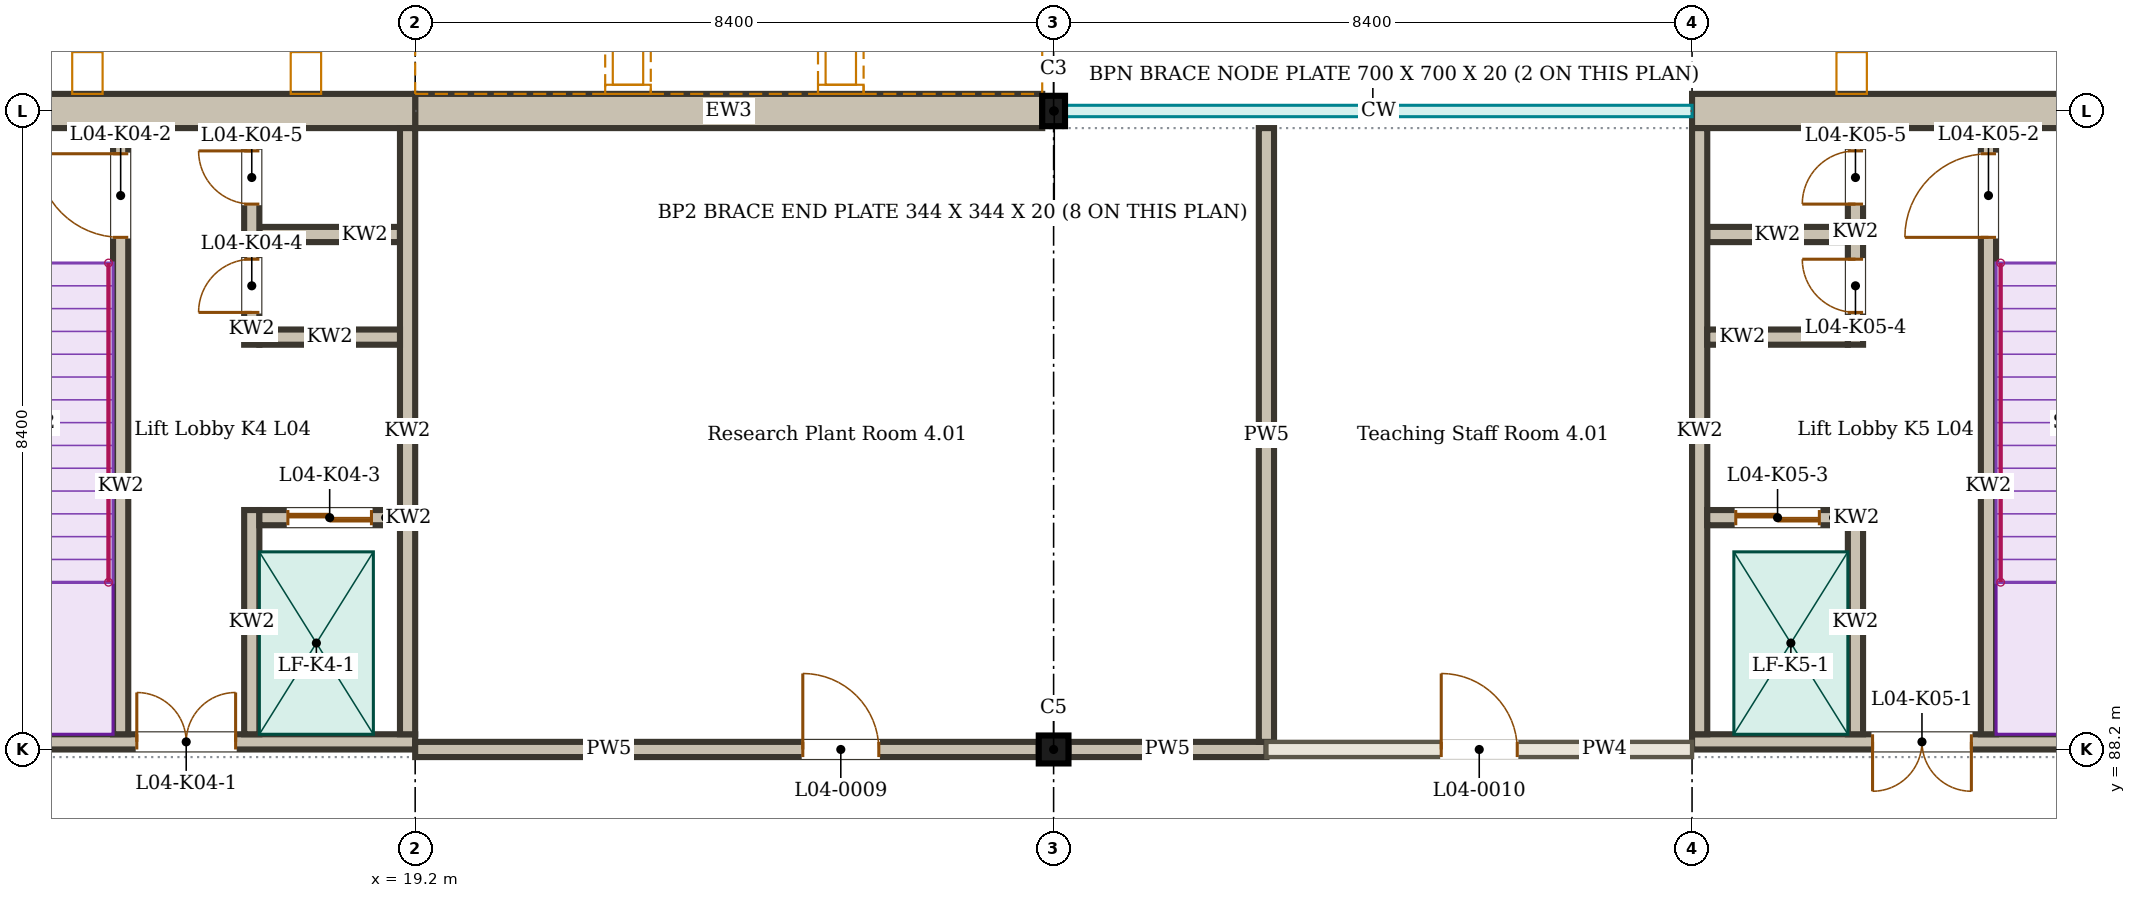
"""IFC4 building model, lengths in metres.
Left out: names, types, materials, properties, quantities, classifications, styles, units other than length and angle.
Written with IfcOpenShell. Run it as: python <this file> out.ifc"""

import sys

from ifc_helpers import new_model, si_unit, direction, frame, frame_2d, origin, origin_2d, place, context, subcontext, project, spatial, rectangle, i_section, extrude, element, fill, save


model = new_model("IFC4")
c1 = context("Model", 3, precision=1e-05, world=origin(), true_north=direction((0.0, 1.0)))
c2 = subcontext(c1, "Body", "Model", "MODEL_VIEW")
j1 = project(units=[si_unit("LENGTHUNIT", "METRE"), si_unit("PLANEANGLEUNIT", "RADIAN")], contexts=[c1])
p1 = place(None, origin())
s1 = spatial("IfcSite", under=j1, at=p1, CompositionType="ELEMENT")
p2 = place(p1, origin())
s2 = spatial("IfcBuilding", under=s1, at=p2, CompositionType="ELEMENT")
p3 = place(p2, frame((0.0, 0.0, 18.0)))
s3 = spatial("IfcBuildingStorey", under=s2, at=p3, CompositionType="ELEMENT", Elevation=18.0)
p4 = place(p3, frame((27.6, 88.2, 0.0), z_axis=(0.0, 0.0, 1.0), x_axis=(1.0, 0.0, 0.0)))
e1 = element("IfcColumn", 1, at=p4, inside=s3, PredefinedType="COLUMN", context=c2, shape_type="SweptSolid", body=[
    extrude(i_section(OverallWidth=0.391, OverallDepth=0.368, WebThickness=0.015, FlangeThickness=0.024, FilletRadius=0.027, at=origin_2d()), origin(), (0.0, 0.0, 1.0), 4.5),
])
p5 = place(p3, frame((27.6, 96.6, 0.0), z_axis=(0.0, 0.0, 1.0), x_axis=(1.0, 0.0, 0.0)))
e2 = element("IfcColumn", 2, at=p5, inside=s3, PredefinedType="COLUMN", context=c2, shape_type="SweptSolid", body=[
    extrude(i_section(OverallWidth=0.3, OverallDepth=0.4, WebThickness=0.013, FlangeThickness=0.024, FilletRadius=0.027, at=origin_2d()), origin(), (0.0, 0.0, 1.0), 4.5),
])
p6 = place(p3, frame((19.2, 96.6, 0.0), z_axis=(0.0, 0.0, 1.0), x_axis=(1.0, 0.0, 0.0)))
e3 = element("IfcWall", 3, at=p6, inside=s3, PredefinedType="SOLIDWALL", context=c2, shape_type="SweptSolid", body=[
    extrude(rectangle(XDim=8.25, YDim=0.45, at=frame_2d((4.125, 0.0))), origin(), (0.0, 0.0, 1.0), 3.886),
])
p7 = place(p3, frame((19.2, 88.2, 0.0), z_axis=(0.0, 0.0, 1.0), x_axis=(1.0, 0.0, 0.0)))
e4 = element("IfcWall", 4, at=p7, inside=s3, PredefinedType="SOLIDWALL", context=c2, shape_type="SweptSolid", body=[
    extrude(rectangle(XDim=8.205, YDim=0.2, at=frame_2d((4.102, 0.0))), origin(), (0.0, 0.0, 1.0), 3.9),
])
p8 = place(p7, frame((5.1, 0.0, 0.0)))
e5 = element("IfcOpeningElement", 5, at=p8, cuts=e4, PredefinedType="OPENING", context=c2, shape_type="SweptSolid", body=[
    extrude(rectangle(XDim=1.0, YDim=2.1, at=frame_2d((0.5, 1.05))), frame((0.0, 0.11, 0.0), z_axis=(0.0, -1.0, 0.0), x_axis=(1.0, 0.0, 0.0)), (0.0, 0.0, 1.0), 0.22),
])
p9 = place(p3, frame((27.795, 88.2, 0.0), z_axis=(0.0, 0.0, 1.0), x_axis=(1.0, 0.0, 0.0)))
e6 = element("IfcWall", 6, at=p9, inside=s3, PredefinedType="SOLIDWALL", context=c2, shape_type="SweptSolid", body=[
    extrude(rectangle(XDim=2.604, YDim=0.2, at=frame_2d((1.302, 0.0))), origin(), (0.0, 0.0, 1.0), 3.9),
])
p10 = place(p3, frame((30.4, 88.2, 0.0), z_axis=(0.0, 0.0, 1.0), x_axis=(1.0, 0.0, 0.0)))
e7 = element("IfcWall", 7, at=p10, inside=s3, PredefinedType="PARTITIONING", context=c2, shape_type="SweptSolid", body=[
    extrude(rectangle(XDim=5.6, YDim=0.2, at=frame_2d((2.8, 0.0))), origin(), (0.0, 0.0, 1.0), 3.9),
])
p11 = place(p10, frame((2.3, 0.0, 0.0)))
e8 = element("IfcOpeningElement", 8, at=p11, cuts=e7, PredefinedType="OPENING", context=c2, shape_type="SweptSolid", body=[
    extrude(rectangle(XDim=1.0, YDim=2.1, at=frame_2d((0.5, 1.05))), frame((0.0, 0.11, 0.0), z_axis=(0.0, -1.0, 0.0), x_axis=(1.0, 0.0, 0.0)), (0.0, 0.0, 1.0), 0.22),
])
p12 = place(p3, frame((30.4, 88.3, 0.0), z_axis=(0.0, 0.0, 1.0), x_axis=(0.0, 1.0, 0.0)))
e9 = element("IfcWall", 9, at=p12, inside=s3, PredefinedType="SOLIDWALL", context=c2, shape_type="SweptSolid", body=[
    extrude(rectangle(XDim=8.075, YDim=0.2, at=frame_2d((4.038, 0.0))), origin(), (0.0, 0.0, 1.0), 3.996),
])
p13 = place(p3, frame((11.025, 88.3, 0.0), z_axis=(0.0, 0.0, 1.0), x_axis=(1.0, 0.0, 0.0)))
e10 = element("IfcWall", 10, at=p13, inside=s3, PredefinedType="SOLIDWALL", context=c2, shape_type="SweptSolid", body=[
    extrude(rectangle(XDim=8.175, YDim=0.2, at=frame_2d((4.087, 0.0))), origin(), (0.0, 0.0, 1.0), 4.5),
])
p14 = place(p13, frame((4.512, 0.0, 0.0)))
e11 = element("IfcOpeningElement", 11, at=p14, cuts=e10, PredefinedType="OPENING", context=c2, shape_type="SweptSolid", body=[
    extrude(rectangle(XDim=1.3, YDim=2.1, at=frame_2d((0.65, 1.05))), frame((0.0, 0.11, 0.0), z_axis=(0.0, -1.0, 0.0), x_axis=(1.0, 0.0, 0.0)), (0.0, 0.0, 1.0), 0.22),
])
p15 = place(p3, frame((10.575, 96.6, 0.0), z_axis=(0.0, 0.0, 1.0), x_axis=(1.0, 0.0, 0.0)))
e12 = element("IfcWall", 12, at=p15, inside=s3, PredefinedType="SOLIDWALL", context=c2, shape_type="SweptSolid", body=[
    extrude(rectangle(XDim=8.625, YDim=0.45, at=frame_2d((4.312, 0.0))), origin(), (0.0, 0.0, 1.0), 4.5),
])
p16 = place(p3, frame((19.1, 88.4, 0.0), z_axis=(0.0, 0.0, 1.0), x_axis=(0.0, 1.0, 0.0)))
e13 = element("IfcWall", 13, at=p16, inside=s3, PredefinedType="SOLIDWALL", context=c2, shape_type="SweptSolid", body=[
    extrude(rectangle(XDim=7.975, YDim=0.2, at=frame_2d((3.988, 0.0))), origin(), (0.0, 0.0, 1.0), 4.5),
])
p17 = place(p3, frame((15.325, 88.4, 0.0), z_axis=(0.0, 0.0, 1.0), x_axis=(0.0, 1.0, 0.0)))
e14 = element("IfcWall", 14, at=p17, inside=s3, PredefinedType="SOLIDWALL", context=c2, shape_type="SweptSolid", body=[
    extrude(rectangle(XDim=7.975, YDim=0.2, at=frame_2d((3.988, 0.0))), origin(), (0.0, 0.0, 1.0), 4.5),
])
p18 = place(p17, frame((6.538, 0.0, 0.0)))
e15 = element("IfcOpeningElement", 15, at=p18, cuts=e14, PredefinedType="OPENING", context=c2, shape_type="SweptSolid", body=[
    extrude(rectangle(XDim=1.1, YDim=2.1, at=frame_2d((0.55, 1.05))), frame((0.0, 0.11, 0.0), z_axis=(0.0, -1.0, 0.0), x_axis=(1.0, 0.0, 0.0)), (0.0, 0.0, 1.0), 0.22),
])
p19 = place(p3, frame((17.05, 88.4, 0.0), z_axis=(0.0, 0.0, 1.0), x_axis=(0.0, 1.0, 0.0)))
e16 = element("IfcWall", 16, at=p19, inside=s3, PredefinedType="SOLIDWALL", context=c2, shape_type="SweptSolid", body=[
    extrude(rectangle(XDim=2.95, YDim=0.2, at=frame_2d((1.475, 0.0))), origin(), (0.0, 0.0, 1.0), 4.5),
])
p20 = place(p3, frame((17.05, 93.525, 0.0), z_axis=(0.0, 0.0, 1.0), x_axis=(0.0, 1.0, 0.0)))
e17 = element("IfcWall", 17, at=p20, inside=s3, PredefinedType="SOLIDWALL", context=c2, shape_type="SweptSolid", body=[
    extrude(rectangle(XDim=2.85, YDim=0.2, at=frame_2d((1.425, 0.0))), origin(), (0.0, 0.0, 1.0), 4.3),
])
p21 = place(p20, frame((0.425, 0.0, 0.0)))
e18 = element("IfcOpeningElement", 18, at=p21, cuts=e17, PredefinedType="OPENING", context=c2, shape_type="SweptSolid", body=[
    extrude(rectangle(XDim=0.7, YDim=2.1, at=frame_2d((0.35, 1.05))), frame((0.0, 0.11, 0.0), z_axis=(0.0, -1.0, 0.0), x_axis=(1.0, 0.0, 0.0)), (0.0, 0.0, 1.0), 0.22),
])
p22 = place(p20, frame((1.85, 0.0, 0.0)))
e19 = element("IfcOpeningElement", 19, at=p22, cuts=e17, PredefinedType="OPENING", context=c2, shape_type="SweptSolid", body=[
    extrude(rectangle(XDim=0.7, YDim=2.1, at=frame_2d((0.35, 1.05))), frame((0.0, 0.11, 0.0), z_axis=(0.0, -1.0, 0.0), x_axis=(1.0, 0.0, 0.0)), (0.0, 0.0, 1.0), 0.22),
])
p23 = place(p3, frame((17.15, 91.25, 0.0), z_axis=(0.0, 0.0, 1.0), x_axis=(1.0, 0.0, 0.0)))
e20 = element("IfcWall", 20, at=p23, inside=s3, PredefinedType="SOLIDWALL", context=c2, shape_type="SweptSolid", body=[
    extrude(rectangle(XDim=1.85, YDim=0.2, at=frame_2d((0.925, 0.0))), origin(), (0.0, 0.0, 1.0), 4.5),
])
p24 = place(p23, frame((0.375, 0.0, 0.0)))
e21 = element("IfcOpeningElement", 21, at=p24, cuts=e20, PredefinedType="OPENING", context=c2, shape_type="SweptSolid", body=[
    extrude(rectangle(XDim=1.1, YDim=2.1, at=frame_2d((0.55, 1.05))), frame((0.0, 0.11, 0.0), z_axis=(0.0, -1.0, 0.0), x_axis=(1.0, 0.0, 0.0)), (0.0, 0.0, 1.0), 0.22),
])
for number, where, z_axis, x_axis in (
    (22, (17.15, 93.625, 0.0), (0.0, 0.0, 1.0), (1.0, 0.0, 0.0)),
    (23, (17.15, 94.975, 0.0), (0.0, 0.0, 1.0), (1.0, 0.0, 0.0)),
):
    element("IfcWall", number, at=place(p3, frame(where, z_axis=z_axis, x_axis=x_axis)), inside=s3, PredefinedType="SOLIDWALL", context=c2, shape_type="SweptSolid", body=[
        extrude(rectangle(XDim=1.85, YDim=0.2, at=frame_2d((0.925, 0.0))), origin(), (0.0, 0.0, 1.0), 4.3),
    ])
p25 = place(p3, frame((44.4, 88.3, 0.0), z_axis=(0.0, 0.0, 1.0), x_axis=(-1.0, 0.0, 0.0)))
e24 = element("IfcWall", 24, at=p25, inside=s3, PredefinedType="SOLIDWALL", context=c2, shape_type="SweptSolid", body=[
    extrude(rectangle(XDim=8.4, YDim=0.2, at=frame_2d((4.2, 0.0))), origin(), (0.0, 0.0, 1.0), 4.5),
])
p26 = place(p25, frame((4.725, 0.0, 0.0)))
e25 = element("IfcOpeningElement", 25, at=p26, cuts=e24, PredefinedType="OPENING", context=c2, shape_type="SweptSolid", body=[
    extrude(rectangle(XDim=1.3, YDim=2.1, at=frame_2d((0.65, 1.05))), frame((0.0, 0.11, 0.0), z_axis=(0.0, -1.0, 0.0), x_axis=(1.0, 0.0, 0.0)), (0.0, 0.0, 1.0), 0.22),
])
p27 = place(p3, frame((44.4, 96.6, 0.0), z_axis=(0.0, 0.0, 1.0), x_axis=(-1.0, 0.0, 0.0)))
e26 = element("IfcWall", 26, at=p27, inside=s3, PredefinedType="SOLIDWALL", context=c2, shape_type="SweptSolid", body=[
    extrude(rectangle(XDim=8.4, YDim=0.45, at=frame_2d((4.2, 0.0))), origin(), (0.0, 0.0, 1.0), 4.5),
])
p28 = place(p3, frame((36.1, 88.4, 0.0), z_axis=(0.0, 0.0, 1.0), x_axis=(0.0, 1.0, 0.0)))
e27 = element("IfcWall", 27, at=p28, inside=s3, PredefinedType="SOLIDWALL", context=c2, shape_type="SweptSolid", body=[
    extrude(rectangle(XDim=7.975, YDim=0.2, at=frame_2d((3.988, 0.0))), origin(), (0.0, 0.0, 1.0), 4.5),
])
p29 = place(p3, frame((39.9, 88.4, 0.0), z_axis=(0.0, 0.0, 1.0), x_axis=(0.0, 1.0, 0.0)))
e28 = element("IfcWall", 28, at=p29, inside=s3, PredefinedType="SOLIDWALL", context=c2, shape_type="SweptSolid", body=[
    extrude(rectangle(XDim=7.975, YDim=0.2, at=frame_2d((3.988, 0.0))), origin(), (0.0, 0.0, 1.0), 4.5),
])
p30 = place(p29, frame((6.538, 0.0, 0.0)))
e29 = element("IfcOpeningElement", 29, at=p30, cuts=e28, PredefinedType="OPENING", context=c2, shape_type="SweptSolid", body=[
    extrude(rectangle(XDim=1.1, YDim=2.1, at=frame_2d((0.55, 1.05))), frame((0.0, 0.11, 0.0), z_axis=(0.0, -1.0, 0.0), x_axis=(1.0, 0.0, 0.0)), (0.0, 0.0, 1.0), 0.22),
])
p31 = place(p3, frame((38.15, 88.4, 0.0), z_axis=(0.0, 0.0, 1.0), x_axis=(0.0, 1.0, 0.0)))
e30 = element("IfcWall", 30, at=p31, inside=s3, PredefinedType="SOLIDWALL", context=c2, shape_type="SweptSolid", body=[
    extrude(rectangle(XDim=2.95, YDim=0.2, at=frame_2d((1.475, 0.0))), origin(), (0.0, 0.0, 1.0), 4.5),
])
p32 = place(p3, frame((38.15, 93.525, 0.0), z_axis=(0.0, 0.0, 1.0), x_axis=(0.0, 1.0, 0.0)))
e31 = element("IfcWall", 31, at=p32, inside=s3, PredefinedType="SOLIDWALL", context=c2, shape_type="SweptSolid", body=[
    extrude(rectangle(XDim=2.85, YDim=0.2, at=frame_2d((1.425, 0.0))), origin(), (0.0, 0.0, 1.0), 4.3),
])
p33 = place(p32, frame((0.425, 0.0, 0.0)))
e32 = element("IfcOpeningElement", 32, at=p33, cuts=e31, PredefinedType="OPENING", context=c2, shape_type="SweptSolid", body=[
    extrude(rectangle(XDim=0.7, YDim=2.1, at=frame_2d((0.35, 1.05))), frame((0.0, 0.11, 0.0), z_axis=(0.0, -1.0, 0.0), x_axis=(1.0, 0.0, 0.0)), (0.0, 0.0, 1.0), 0.22),
])
p34 = place(p32, frame((1.85, 0.0, 0.0)))
e33 = element("IfcOpeningElement", 33, at=p34, cuts=e31, PredefinedType="OPENING", context=c2, shape_type="SweptSolid", body=[
    extrude(rectangle(XDim=0.7, YDim=2.1, at=frame_2d((0.35, 1.05))), frame((0.0, 0.11, 0.0), z_axis=(0.0, -1.0, 0.0), x_axis=(1.0, 0.0, 0.0)), (0.0, 0.0, 1.0), 0.22),
])
p35 = place(p3, frame((38.05, 91.25, 0.0), z_axis=(0.0, 0.0, 1.0), x_axis=(-1.0, 0.0, 0.0)))
e34 = element("IfcWall", 34, at=p35, inside=s3, PredefinedType="SOLIDWALL", context=c2, shape_type="SweptSolid", body=[
    extrude(rectangle(XDim=1.85, YDim=0.2, at=frame_2d((0.925, 0.0))), origin(), (0.0, 0.0, 1.0), 4.5),
])
p36 = place(p35, frame((0.375, 0.0, 0.0)))
e35 = element("IfcOpeningElement", 35, at=p36, cuts=e34, PredefinedType="OPENING", context=c2, shape_type="SweptSolid", body=[
    extrude(rectangle(XDim=1.1, YDim=2.1, at=frame_2d((0.55, 1.05))), frame((0.0, 0.11, 0.0), z_axis=(0.0, -1.0, 0.0), x_axis=(1.0, 0.0, 0.0)), (0.0, 0.0, 1.0), 0.22),
])
for number, where, z_axis, x_axis in (
    (36, (38.05, 93.625, 0.0), (0.0, 0.0, 1.0), (-1.0, 0.0, 0.0)),
    (37, (38.05, 94.975, 0.0), (0.0, 0.0, 1.0), (-1.0, 0.0, 0.0)),
):
    element("IfcWall", number, at=place(p3, frame(where, z_axis=z_axis, x_axis=x_axis)), inside=s3, PredefinedType="SOLIDWALL", context=c2, shape_type="SweptSolid", body=[
        extrude(rectangle(XDim=1.85, YDim=0.2, at=frame_2d((0.925, 0.0))), origin(), (0.0, 0.0, 1.0), 4.3),
    ])
p37 = place(p8, origin())
e38 = element("IfcDoor", 38, at=p37, inside=s3, OperationType="SINGLE_SWING_LEFT", PredefinedType="DOOR", context=c2, shape_type="SweptSolid", body=[
    extrude(rectangle(XDim=1.0, YDim=2.1, at=frame_2d((0.5, 1.05))), frame((0.0, 0.025, 0.0), z_axis=(0.0, -1.0, 0.0), x_axis=(1.0, 0.0, 0.0)), (0.0, 0.0, 1.0), 0.05),
])
fill(e5, e38)
p38 = place(p11, origin())
e39 = element("IfcDoor", 39, at=p38, inside=s3, OperationType="SINGLE_SWING_LEFT", PredefinedType="DOOR", context=c2, shape_type="SweptSolid", body=[
    extrude(rectangle(XDim=1.0, YDim=2.1, at=frame_2d((0.5, 1.05))), frame((0.0, 0.025, 0.0), z_axis=(0.0, -1.0, 0.0), x_axis=(1.0, 0.0, 0.0)), (0.0, 0.0, 1.0), 0.05),
])
fill(e8, e39)
p39 = place(p14, origin())
e40 = element("IfcDoor", 40, at=p39, inside=s3, OperationType="DOUBLE_DOOR_DOUBLE_SWING", PredefinedType="DOOR", context=c2, shape_type="SweptSolid", body=[
    extrude(rectangle(XDim=1.3, YDim=2.1, at=frame_2d((0.65, 1.05))), frame((0.0, 0.025, 0.0), z_axis=(0.0, -1.0, 0.0), x_axis=(1.0, 0.0, 0.0)), (0.0, 0.0, 1.0), 0.05),
])
fill(e11, e40)
p40 = place(p18, origin())
e41 = element("IfcDoor", 41, at=p40, inside=s3, OperationType="SINGLE_SWING_RIGHT", PredefinedType="DOOR", context=c2, shape_type="SweptSolid", body=[
    extrude(rectangle(XDim=1.1, YDim=2.1, at=frame_2d((0.55, 1.05))), frame((0.0, 0.025, 0.0), z_axis=(0.0, -1.0, 0.0), x_axis=(1.0, 0.0, 0.0)), (0.0, 0.0, 1.0), 0.05),
])
fill(e15, e41)
p41 = place(p24, origin())
e42 = element("IfcDoor", 42, at=p41, inside=s3, OperationType="DOUBLE_DOOR_SLIDING", PredefinedType="DOOR", context=c2, shape_type="SweptSolid", body=[
    extrude(rectangle(XDim=1.1, YDim=2.1, at=frame_2d((0.55, 1.05))), frame((0.0, 0.025, 0.0), z_axis=(0.0, -1.0, 0.0), x_axis=(1.0, 0.0, 0.0)), (0.0, 0.0, 1.0), 0.05),
])
fill(e21, e42)
p42 = place(p21, origin())
e43 = element("IfcDoor", 43, at=p42, inside=s3, OperationType="SINGLE_SWING_LEFT", PredefinedType="DOOR", context=c2, shape_type="SweptSolid", body=[
    extrude(rectangle(XDim=0.7, YDim=2.1, at=frame_2d((0.35, 1.05))), frame((0.0, 0.025, 0.0), z_axis=(0.0, -1.0, 0.0), x_axis=(1.0, 0.0, 0.0)), (0.0, 0.0, 1.0), 0.05),
])
fill(e18, e43)
p43 = place(p22, origin())
e44 = element("IfcDoor", 44, at=p43, inside=s3, OperationType="SINGLE_SWING_RIGHT", PredefinedType="DOOR", context=c2, shape_type="SweptSolid", body=[
    extrude(rectangle(XDim=0.7, YDim=2.1, at=frame_2d((0.35, 1.05))), frame((0.0, 0.025, 0.0), z_axis=(0.0, -1.0, 0.0), x_axis=(1.0, 0.0, 0.0)), (0.0, 0.0, 1.0), 0.05),
])
fill(e19, e44)
p44 = place(p26, origin())
e45 = element("IfcDoor", 45, at=p44, inside=s3, OperationType="DOUBLE_DOOR_DOUBLE_SWING", PredefinedType="DOOR", context=c2, shape_type="SweptSolid", body=[
    extrude(rectangle(XDim=1.3, YDim=2.1, at=frame_2d((0.65, 1.05))), frame((0.0, 0.025, 0.0), z_axis=(0.0, -1.0, 0.0), x_axis=(1.0, 0.0, 0.0)), (0.0, 0.0, 1.0), 0.05),
])
fill(e25, e45)
p45 = place(p30, origin())
e46 = element("IfcDoor", 46, at=p45, inside=s3, OperationType="SINGLE_SWING_LEFT", PredefinedType="DOOR", context=c2, shape_type="SweptSolid", body=[
    extrude(rectangle(XDim=1.1, YDim=2.1, at=frame_2d((0.55, 1.05))), frame((0.0, 0.025, 0.0), z_axis=(0.0, -1.0, 0.0), x_axis=(1.0, 0.0, 0.0)), (0.0, 0.0, 1.0), 0.05),
])
fill(e29, e46)
p46 = place(p36, origin())
e47 = element("IfcDoor", 47, at=p46, inside=s3, OperationType="DOUBLE_DOOR_SLIDING", PredefinedType="DOOR", context=c2, shape_type="SweptSolid", body=[
    extrude(rectangle(XDim=1.1, YDim=2.1, at=frame_2d((0.55, 1.05))), frame((0.0, 0.025, 0.0), z_axis=(0.0, -1.0, 0.0), x_axis=(1.0, 0.0, 0.0)), (0.0, 0.0, 1.0), 0.05),
])
fill(e35, e47)
p47 = place(p33, origin())
e48 = element("IfcDoor", 48, at=p47, inside=s3, OperationType="SINGLE_SWING_RIGHT", PredefinedType="DOOR", context=c2, shape_type="SweptSolid", body=[
    extrude(rectangle(XDim=0.7, YDim=2.1, at=frame_2d((0.35, 1.05))), frame((0.0, 0.025, 0.0), z_axis=(0.0, -1.0, 0.0), x_axis=(1.0, 0.0, 0.0)), (0.0, 0.0, 1.0), 0.05),
])
fill(e32, e48)
p48 = place(p34, origin())
e49 = element("IfcDoor", 49, at=p48, inside=s3, OperationType="SINGLE_SWING_LEFT", PredefinedType="DOOR", context=c2, shape_type="SweptSolid", body=[
    extrude(rectangle(XDim=0.7, YDim=2.1, at=frame_2d((0.35, 1.05))), frame((0.0, 0.025, 0.0), z_axis=(0.0, -1.0, 0.0), x_axis=(1.0, 0.0, 0.0)), (0.0, 0.0, 1.0), 0.05),
])
fill(e33, e49)
save(model, sys.argv[1])
